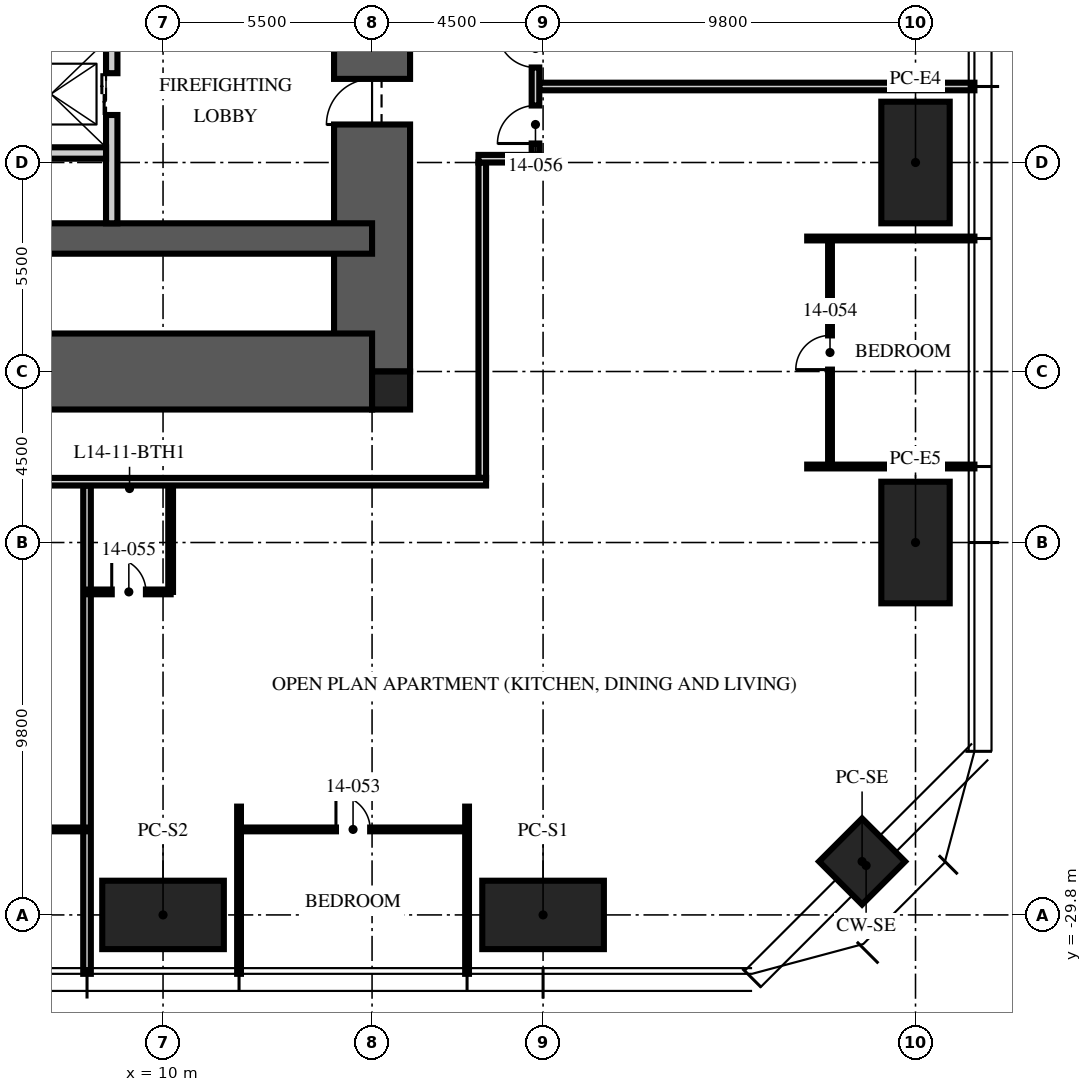
"""IFC4 building model, lengths in metres.
Left out: names, types, materials, properties, quantities, classifications, styles, units other than length and angle.
Written with IfcOpenShell. Run it as: python <this file> out.ifc"""

import sys

from ifc_helpers import new_model, si_unit, direction, frame, frame_2d, origin, origin_2d, place, context, subcontext, project, spatial, rectangle, hollow_rectangle, extrude, element, fill, save


model = new_model("IFC4")
c1 = context("Model", 3, precision=1e-05, world=origin(), true_north=direction((0.0, 1.0)))
c2 = subcontext(c1, "Body", "Model", "MODEL_VIEW")
j1 = project(units=[si_unit("LENGTHUNIT", "METRE"), si_unit("PLANEANGLEUNIT", "RADIAN")], contexts=[c1])
p1 = place(None, origin())
s1 = spatial("IfcSite", under=j1, at=p1, CompositionType="ELEMENT")
p2 = place(p1, origin())
s2 = spatial("IfcBuilding", under=s1, at=p2, CompositionType="ELEMENT")
p3 = place(p2, frame((0.0, 0.0, 58.5)))
s3 = spatial("IfcBuildingStorey", under=s2, at=p3, CompositionType="ELEMENT", Elevation=58.5)
p4 = place(p3, frame((15.5, -15.5, -0.25), z_axis=(0.0, 0.0, 1.0), x_axis=(0.0, 1.0, 0.0)))
e1 = element("IfcWall", 1, at=p4, inside=s3, PredefinedType="SHEAR", context=c2, shape_type="SweptSolid", body=[
    extrude(rectangle(XDim=31.0, YDim=2.0, at=frame_2d((15.5, 0.0))), origin(), (0.0, 0.0, 1.0), 3.75),
])
p5 = place(p4, frame((6.5, 0.0, 0.25)))
e2 = element("IfcOpeningElement", 2, at=p5, cuts=e1, PredefinedType="OPENING", context=c2, shape_type="SweptSolid", body=[
    extrude(rectangle(XDim=1.2, YDim=2.1, at=frame_2d((0.6, 1.05))), frame((0.0, 1.01, 0.0), z_axis=(0.0, -1.0, 0.0), x_axis=(1.0, 0.0, 0.0)), (0.0, 0.0, 1.0), 2.02),
])
p6 = place(p4, frame((23.0, 0.0, 0.25)))
e3 = element("IfcOpeningElement", 3, at=p6, cuts=e1, PredefinedType="OPENING", context=c2, shape_type="SweptSolid", body=[
    extrude(rectangle(XDim=1.8, YDim=2.1, at=frame_2d((0.9, 1.05))), frame((0.0, 1.01, 0.0), z_axis=(0.0, -1.0, 0.0), x_axis=(1.0, 0.0, 0.0)), (0.0, 0.0, 1.0), 2.02),
])
p7 = place(p3, frame((-15.5, -15.5, -0.25), z_axis=(0.0, 0.0, 1.0), x_axis=(1.0, 0.0, 0.0)))
e4 = element("IfcWall", 4, at=p7, inside=s3, PredefinedType="SHEAR", context=c2, shape_type="SweptSolid", body=[
    extrude(rectangle(XDim=31.0, YDim=2.0, at=frame_2d((15.5, 0.0))), origin(), (0.0, 0.0, 1.0), 3.75),
])
p8 = place(p3, frame((-15.5, -12.0, -0.25), z_axis=(0.0, 0.0, 1.0), x_axis=(1.0, 0.0, 0.0)))
e5 = element("IfcWall", 5, at=p8, inside=s3, PredefinedType="SHEAR", context=c2, shape_type="SweptSolid", body=[
    extrude(rectangle(XDim=31.0, YDim=0.8, at=frame_2d((15.5, 0.0))), origin(), (0.0, 0.0, 1.0), 3.75),
])
p9 = place(p3, frame((16.0, -16.0, -0.25), z_axis=(0.0, 0.0, 1.0), x_axis=(1.0, 0.0, 0.0)))
e6 = element("IfcColumn", 6, at=p9, inside=s3, PredefinedType="COLUMN", context=c2, shape_type="SweptSolid", body=[
    extrude(rectangle(XDim=1.0, YDim=1.0, at=origin_2d()), origin(), (0.0, 0.0, 1.0), 3.75),
])
for number, where, z_axis, x_axis in (
    (7, (29.8, -10.0, 0.0), (0.0, 0.0, 1.0), (0.0, 1.0, 0.0)),
    (8, (29.8, -20.0, 0.0), (0.0, 0.0, 1.0), (0.0, 1.0, 0.0)),
    (9, (20.0, -29.8, 0.0), (0.0, 0.0, 1.0), (1.0, 0.0, 0.0)),
    (10, (10.0, -29.8, 0.0), (0.0, 0.0, 1.0), (1.0, 0.0, 0.0)),
):
    element("IfcColumn", number, at=place(p3, frame(where, z_axis=z_axis, x_axis=x_axis)), inside=s3, PredefinedType="COLUMN", context=c2, shape_type="SweptSolid", body=[
        extrude(hollow_rectangle(XDim=3.2, YDim=1.8, WallThickness=0.2, at=origin_2d()), origin(), (0.0, 0.0, 1.0), 3.75),
    ])
p10 = place(p3, frame((28.394, -28.394, 0.0), z_axis=(0.0, 0.0, 1.0), x_axis=(0.707106781187, 0.707106781187, 0.0)))
e11 = element("IfcColumn", 11, at=p10, inside=s3, PredefinedType="COLUMN", context=c2, shape_type="SweptSolid", body=[
    extrude(hollow_rectangle(XDim=1.6, YDim=1.6, WallThickness=0.1, at=origin_2d()), origin(), (0.0, 0.0, 1.0), 3.75),
])
p11 = place(p3, frame((8.65, -11.6, 0.0), z_axis=(0.0, 0.0, 1.0), x_axis=(0.0, 1.0, 0.0)))
e12 = element("IfcWall", 12, at=p11, inside=s3, PredefinedType="PARTITIONING", context=c2, shape_type="SweptSolid", body=[
    extrude(rectangle(XDim=6.7, YDim=0.3, at=frame_2d((3.35, 0.0))), origin(), (0.0, 0.0, 1.0), 3.5),
])
p12 = place(p11, frame((2.85, 0.0, 0.0)))
e13 = element("IfcOpeningElement", 13, at=p12, cuts=e12, PredefinedType="OPENING", context=c2, shape_type="SweptSolid", body=[
    extrude(rectangle(XDim=1.1, YDim=2.1, at=frame_2d((0.55, 1.05))), frame((0.0, 0.16, 0.0), z_axis=(0.0, -1.0, 0.0), x_axis=(1.0, 0.0, 0.0)), (0.0, 0.0, 1.0), 0.32),
])
p13 = place(p3, frame((5.6, -9.75, 0.0), z_axis=(0.0, 0.0, 1.0), x_axis=(1.0, 0.0, 0.0)))
e14 = element("IfcWall", 14, at=p13, inside=s3, PredefinedType="PARTITIONING", context=c2, shape_type="SweptSolid", body=[
    extrude(rectangle(XDim=2.9, YDim=0.3, at=frame_2d((1.45, 0.0))), origin(), (0.0, 0.0, 1.0), 3.5),
])
p14 = place(p3, frame((19.9, -8.0, 0.0), z_axis=(0.0, 0.0, 1.0), x_axis=(1.0, 0.0, 0.0)))
e15 = element("IfcWall", 15, at=p14, inside=s3, PredefinedType="PARTITIONING", context=c2, shape_type="SweptSolid", body=[
    extrude(rectangle(XDim=11.45, YDim=0.2, at=frame_2d((5.725, 0.0))), origin(), (0.0, 0.0, 1.0), 2.71),
])
p15 = place(p3, frame((8.0, -18.5, 0.0), z_axis=(0.0, 0.0, 1.0), x_axis=(0.0, -1.0, 0.0)))
e16 = element("IfcWall", 16, at=p15, inside=s3, PredefinedType="PARTITIONING", context=c2, shape_type="SweptSolid", body=[
    extrude(rectangle(XDim=12.85, YDim=0.2, at=frame_2d((6.425, 0.0))), origin(), (0.0, 0.0, 1.0), 2.71),
])
for number, where, z_axis, x_axis in (
    (17, (12.0, -26.95, 0.0), (0.0, 0.0, 1.0), (0.0, -1.0, 0.0)),
    (18, (18.0, -26.95, 0.0), (0.0, 0.0, 1.0), (0.0, -1.0, 0.0)),
    (19, (26.95, -18.0, 0.0), (0.0, 0.0, 1.0), (1.0, 0.0, 0.0)),
    (20, (26.95, -12.0, 0.0), (0.0, 0.0, 1.0), (1.0, 0.0, 0.0)),
):
    element("IfcWall", number, at=place(p3, frame(where, z_axis=z_axis, x_axis=x_axis)), inside=s3, PredefinedType="PARTITIONING", context=c2, shape_type="SweptSolid", body=[
        extrude(rectangle(XDim=4.4, YDim=0.1, at=frame_2d((2.2, 0.0))), origin(), (0.0, 0.0, 1.0), 2.71),
    ])
p16 = place(p3, frame((2.0, -27.55, 0.0), z_axis=(0.0, 0.0, 1.0), x_axis=(1.0, 0.0, 0.0)))
e21 = element("IfcWall", 21, at=p16, inside=s3, PredefinedType="PARTITIONING", context=c2, shape_type="SweptSolid", body=[
    extrude(rectangle(XDim=6.0, YDim=0.1, at=frame_2d((3.0, 0.0))), origin(), (0.0, 0.0, 1.0), 2.61),
])
p17 = place(p16, frame((2.55, 0.0, 0.0)))
e22 = element("IfcOpeningElement", 22, at=p17, cuts=e21, PredefinedType="OPENING", context=c2, shape_type="SweptSolid", body=[
    extrude(rectangle(XDim=0.9, YDim=2.1, at=frame_2d((0.45, 1.05))), frame((0.0, 0.06, 0.0), z_axis=(0.0, -1.0, 0.0), x_axis=(1.0, 0.0, 0.0)), (0.0, 0.0, 1.0), 0.12),
])
p18 = place(p3, frame((12.0, -27.55, 0.0), z_axis=(0.0, 0.0, 1.0), x_axis=(1.0, 0.0, 0.0)))
e23 = element("IfcWall", 23, at=p18, inside=s3, PredefinedType="PARTITIONING", context=c2, shape_type="SweptSolid", body=[
    extrude(rectangle(XDim=6.0, YDim=0.1, at=frame_2d((3.0, 0.0))), origin(), (0.0, 0.0, 1.0), 2.61),
])
p19 = place(p18, frame((2.55, 0.0, 0.0)))
e24 = element("IfcOpeningElement", 24, at=p19, cuts=e23, PredefinedType="OPENING", context=c2, shape_type="SweptSolid", body=[
    extrude(rectangle(XDim=0.9, YDim=2.1, at=frame_2d((0.45, 1.05))), frame((0.0, 0.06, 0.0), z_axis=(0.0, -1.0, 0.0), x_axis=(1.0, 0.0, 0.0)), (0.0, 0.0, 1.0), 0.12),
])
p20 = place(p3, frame((27.55, -18.0, 0.0), z_axis=(0.0, 0.0, 1.0), x_axis=(0.0, 1.0, 0.0)))
e25 = element("IfcWall", 25, at=p20, inside=s3, PredefinedType="PARTITIONING", context=c2, shape_type="SweptSolid", body=[
    extrude(rectangle(XDim=6.0, YDim=0.1, at=frame_2d((3.0, 0.0))), origin(), (0.0, 0.0, 1.0), 2.61),
])
p21 = place(p20, frame((2.55, 0.0, 0.0)))
e26 = element("IfcOpeningElement", 26, at=p21, cuts=e25, PredefinedType="OPENING", context=c2, shape_type="SweptSolid", body=[
    extrude(rectangle(XDim=0.9, YDim=2.1, at=frame_2d((0.45, 1.05))), frame((0.0, 0.06, 0.0), z_axis=(0.0, -1.0, 0.0), x_axis=(1.0, 0.0, 0.0)), (0.0, 0.0, 1.0), 0.12),
])
p22 = place(p3, frame((8.0, -21.3, 0.0), z_axis=(0.0, 0.0, 1.0), x_axis=(1.0, 0.0, 0.0)))
e27 = element("IfcWall", 27, at=p22, inside=s3, PredefinedType="PARTITIONING", context=c2, shape_type="SweptSolid", body=[
    extrude(rectangle(XDim=2.2, YDim=0.125, at=frame_2d((1.1, 0.0))), origin(), (0.0, 0.0, 1.0), 2.492),
])
p23 = place(p22, frame((0.65, 0.0, 0.0)))
e28 = element("IfcOpeningElement", 28, at=p23, cuts=e27, PredefinedType="OPENING", context=c2, shape_type="SweptSolid", body=[
    extrude(rectangle(XDim=0.9, YDim=2.1, at=frame_2d((0.45, 1.05))), frame((0.0, 0.073, 0.0), z_axis=(0.0, -1.0, 0.0), x_axis=(1.0, 0.0, 0.0)), (0.0, 0.0, 1.0), 0.145),
])
p24 = place(p3, frame((10.2, -18.5, 0.0), z_axis=(0.0, 0.0, 1.0), x_axis=(0.0, -1.0, 0.0)))
e29 = element("IfcWall", 29, at=p24, inside=s3, PredefinedType="PARTITIONING", context=c2, shape_type="SweptSolid", body=[
    extrude(rectangle(XDim=2.8, YDim=0.125, at=frame_2d((1.4, 0.0))), origin(), (0.0, 0.0, 1.0), 2.492),
])
p25 = place(p3, frame((18.4, -18.3, 0.0), z_axis=(0.0, 0.0, 1.0), x_axis=(0.0, 1.0, 0.0)))
e30 = element("IfcWall", 30, at=p25, inside=s3, PredefinedType="PARTITIONING", context=c2, shape_type="SweptSolid", body=[
    extrude(rectangle(XDim=8.3, YDim=0.2, at=frame_2d((4.15, 0.0))), origin(), (0.0, 0.0, 1.0), 2.3),
])
p26 = place(p3, frame((18.3, -9.9, 0.0), z_axis=(0.0, 0.0, 1.0), x_axis=(1.0, 0.0, 0.0)))
e31 = element("IfcWall", 31, at=p26, inside=s3, PredefinedType="PARTITIONING", context=c2, shape_type="SweptSolid", body=[
    extrude(rectangle(XDim=1.6, YDim=0.2, at=frame_2d((0.8, 0.0))), origin(), (0.0, 0.0, 1.0), 2.492),
])
p27 = place(p3, frame((19.8, -9.8, 0.0), z_axis=(0.0, 0.0, 1.0), x_axis=(0.0, 1.0, 0.0)))
e32 = element("IfcWall", 32, at=p27, inside=s3, PredefinedType="PARTITIONING", context=c2, shape_type="SweptSolid", body=[
    extrude(rectangle(XDim=3.6, YDim=0.2, at=frame_2d((1.8, 0.0))), origin(), (0.0, 0.0, 1.0), 3.5),
])
p28 = place(p27, frame((2.3, 0.0, 0.0)))
e33 = element("IfcOpeningElement", 33, at=p28, cuts=e32, PredefinedType="OPENING", context=c2, shape_type="SweptSolid", body=[
    extrude(rectangle(XDim=1.0, YDim=2.2, at=frame_2d((0.5, 1.1))), frame((0.0, 0.11, 0.0), z_axis=(0.0, -1.0, 0.0), x_axis=(1.0, 0.0, 0.0)), (0.0, 0.0, 1.0), 0.22),
])
p29 = place(p27, frame((0.3, 0.0, 0.0)))
e34 = element("IfcOpeningElement", 34, at=p29, cuts=e32, PredefinedType="OPENING", context=c2, shape_type="SweptSolid", body=[
    extrude(rectangle(XDim=1.0, YDim=2.2, at=frame_2d((0.5, 1.1))), frame((0.0, 0.11, 0.0), z_axis=(0.0, -1.0, 0.0), x_axis=(1.0, 0.0, 0.0)), (0.0, 0.0, 1.0), 0.22),
])
p30 = place(p3, frame((18.5, -18.4, 0.0), z_axis=(0.0, 0.0, 1.0), x_axis=(-1.0, 0.0, 0.0)))
e35 = element("IfcWall", 35, at=p30, inside=s3, PredefinedType="PARTITIONING", context=c2, shape_type="SweptSolid", body=[
    extrude(rectangle(XDim=18.5, YDim=0.2, at=frame_2d((9.25, 0.0))), origin(), (0.0, 0.0, 1.0), 2.3),
])
p31 = place(p5, origin())
e36 = element("IfcDoor", 36, at=p31, inside=s3, OperationType="SINGLE_SWING_LEFT", PredefinedType="DOOR", context=c2, shape_type="SweptSolid", body=[
    extrude(rectangle(XDim=1.2, YDim=2.1, at=frame_2d((0.6, 1.05))), frame((0.0, 0.025, 0.0), z_axis=(0.0, -1.0, 0.0), x_axis=(1.0, 0.0, 0.0)), (0.0, 0.0, 1.0), 0.05),
])
fill(e2, e36)
p32 = place(p12, origin())
e37 = element("IfcDoor", 37, at=p32, inside=s3, OperationType="DOUBLE_DOOR_SLIDING", PredefinedType="DOOR", context=c2, shape_type="SweptSolid", body=[
    extrude(rectangle(XDim=1.1, YDim=2.1, at=frame_2d((0.55, 1.05))), frame((0.0, 0.025, 0.0), z_axis=(0.0, -1.0, 0.0), x_axis=(1.0, 0.0, 0.0)), (0.0, 0.0, 1.0), 0.05),
])
fill(e13, e37)
p33 = place(p28, origin())
e38 = element("IfcDoor", 38, at=p33, inside=s3, OperationType="SINGLE_SWING_RIGHT", PredefinedType="DOOR", context=c2, shape_type="SweptSolid", body=[
    extrude(rectangle(XDim=1.0, YDim=2.2, at=frame_2d((0.5, 1.1))), frame((0.0, 0.025, 0.0), z_axis=(0.0, -1.0, 0.0), x_axis=(1.0, 0.0, 0.0)), (0.0, 0.0, 1.0), 0.05),
])
fill(e33, e38)
p34 = place(p19, origin())
e39 = element("IfcDoor", 39, at=p34, inside=s3, OperationType="SINGLE_SWING_LEFT", PredefinedType="DOOR", context=c2, shape_type="SweptSolid", body=[
    extrude(rectangle(XDim=0.9, YDim=2.1, at=frame_2d((0.45, 1.05))), frame((0.0, 0.025, 0.0), z_axis=(0.0, -1.0, 0.0), x_axis=(1.0, 0.0, 0.0)), (0.0, 0.0, 1.0), 0.05),
])
fill(e24, e39)
p35 = place(p21, origin())
e40 = element("IfcDoor", 40, at=p35, inside=s3, OperationType="SINGLE_SWING_LEFT", PredefinedType="DOOR", context=c2, shape_type="SweptSolid", body=[
    extrude(rectangle(XDim=0.9, YDim=2.1, at=frame_2d((0.45, 1.05))), frame((0.0, 0.025, 0.0), z_axis=(0.0, -1.0, 0.0), x_axis=(1.0, 0.0, 0.0)), (0.0, 0.0, 1.0), 0.05),
])
fill(e26, e40)
p36 = place(p23, origin())
e41 = element("IfcDoor", 41, at=p36, inside=s3, OperationType="SINGLE_SWING_LEFT", PredefinedType="DOOR", context=c2, shape_type="SweptSolid", body=[
    extrude(rectangle(XDim=0.9, YDim=2.1, at=frame_2d((0.45, 1.05))), frame((0.0, 0.025, 0.0), z_axis=(0.0, -1.0, 0.0), x_axis=(1.0, 0.0, 0.0)), (0.0, 0.0, 1.0), 0.05),
])
fill(e28, e41)
p37 = place(p29, origin())
e42 = element("IfcDoor", 42, at=p37, inside=s3, OperationType="SINGLE_SWING_LEFT", PredefinedType="DOOR", context=c2, shape_type="SweptSolid", body=[
    extrude(rectangle(XDim=1.0, YDim=2.2, at=frame_2d((0.5, 1.1))), frame((0.0, 0.025, 0.0), z_axis=(0.0, -1.0, 0.0), x_axis=(1.0, 0.0, 0.0)), (0.0, 0.0, 1.0), 0.05),
])
fill(e34, e42)
save(model, sys.argv[1])
